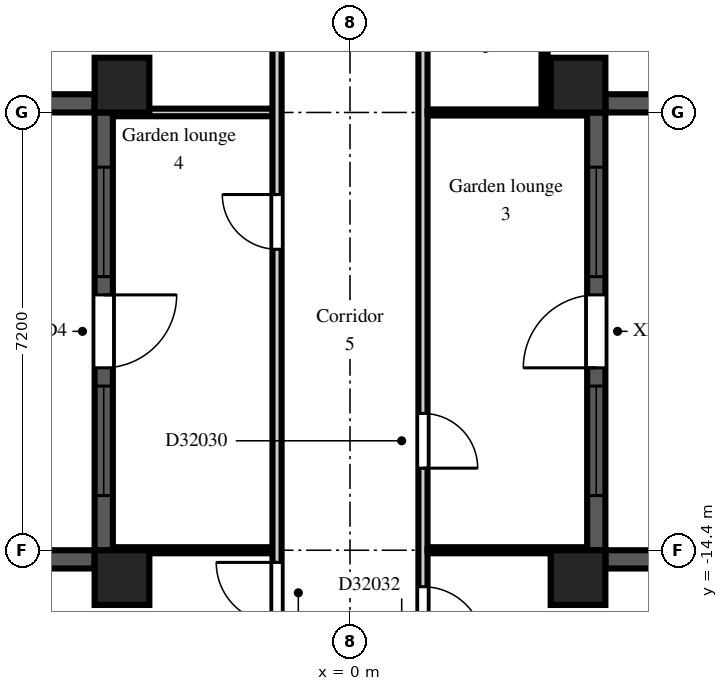
"""IFC4 building model, lengths in metres.
Left out: names, types, materials, properties, quantities, classifications, styles, units other than length and angle.
Written with IfcOpenShell. Run it as: python <this file> out.ifc"""

import sys

from ifc_helpers import new_model, si_unit, direction, frame, frame_2d, origin, origin_2d, place, context, subcontext, project, spatial, rectangle, extrude, element, fill, save


model = new_model("IFC4")
c1 = context("Model", 3, precision=1e-05, world=origin(), true_north=direction((0.0, 1.0)))
c2 = subcontext(c1, "Body", "Model", "MODEL_VIEW")
j1 = project(units=[si_unit("LENGTHUNIT", "METRE"), si_unit("PLANEANGLEUNIT", "RADIAN")], contexts=[c1])
p1 = place(None, origin())
s1 = spatial("IfcSite", under=j1, at=p1, CompositionType="ELEMENT")
p2 = place(p1, origin())
s2 = spatial("IfcBuilding", under=s1, at=p2, CompositionType="ELEMENT")
p3 = place(p2, frame((0.0, 0.0, 225.9)))
s3 = spatial("IfcBuildingStorey", under=s2, at=p3, CompositionType="ELEMENT", Elevation=225.9)
for number, where, z_axis, x_axis in (
    (1, (-3.75, -14.85, 0.0), (0.0, 0.0, 1.0), (1.0, 0.0, 0.0)),
    (2, (-3.75, -6.75, 0.0), (0.0, 0.0, 1.0), (1.0, 0.0, 0.0)),
    (3, (3.75, -14.85, 0.0), (0.0, 0.0, 1.0), (1.0, 0.0, 0.0)),
    (4, (3.75, -6.75, 0.0), (0.0, 0.0, 1.0), (1.0, 0.0, 0.0)),
):
    element("IfcColumn", number, at=place(p3, frame(where, z_axis=z_axis, x_axis=x_axis)), inside=s3, PredefinedType="COLUMN", context=c2, shape_type="SweptSolid", body=[
        extrude(rectangle(XDim=0.9, YDim=0.9, at=origin_2d()), origin(), (0.0, 0.0, 1.0), 3.0),
    ])
p4 = place(p3, frame((-7.2, -7.05, 0.0), z_axis=(0.0, 0.0, 1.0), x_axis=(1.0, 0.0, 0.0)))
e5 = element("IfcWall", 5, at=p4, inside=s3, PredefinedType="SOLIDWALL", context=c2, shape_type="SweptSolid", body=[
    extrude(rectangle(XDim=3.0, YDim=0.3, at=frame_2d((1.5, 0.0))), origin(), (0.0, 0.0, 1.0), 2.3),
])
p5 = place(p3, frame((-4.05, -7.2, 0.0), z_axis=(0.0, 0.0, 1.0), x_axis=(0.0, -1.0, 0.0)))
e6 = element("IfcWall", 6, at=p5, inside=s3, PredefinedType="SOLIDWALL", context=c2, shape_type="SweptSolid", body=[
    extrude(rectangle(XDim=7.2, YDim=0.3, at=frame_2d((3.6, 0.0))), origin(), (0.0, 0.0, 1.0), 2.3),
])
p6 = place(p5, frame((3.0, 0.0, 0.0)))
e7 = element("IfcOpeningElement", 7, at=p6, cuts=e6, PredefinedType="OPENING", context=c2, shape_type="SweptSolid", body=[
    extrude(rectangle(XDim=1.2, YDim=2.05, at=frame_2d((0.6, 1.025))), frame((0.0, 0.16, 0.0), z_axis=(0.0, -1.0, 0.0), x_axis=(1.0, 0.0, 0.0)), (0.0, 0.0, 1.0), 0.32),
])
p7 = place(p5, frame((0.9, 0.0, 0.2)))
e8 = element("IfcOpeningElement", 8, at=p7, cuts=e6, PredefinedType="OPENING", context=c2, shape_type="SweptSolid", body=[
    extrude(rectangle(XDim=1.8, YDim=1.85, at=frame_2d((0.9, 0.925))), frame((0.0, 0.16, 0.0), z_axis=(0.0, -1.0, 0.0), x_axis=(1.0, 0.0, 0.0)), (0.0, 0.0, 1.0), 0.32),
])
p8 = place(p5, frame((4.5, 0.0, 0.2)))
e9 = element("IfcOpeningElement", 9, at=p8, cuts=e6, PredefinedType="OPENING", context=c2, shape_type="SweptSolid", body=[
    extrude(rectangle(XDim=1.8, YDim=1.85, at=frame_2d((0.9, 0.925))), frame((0.0, 0.16, 0.0), z_axis=(0.0, -1.0, 0.0), x_axis=(1.0, 0.0, 0.0)), (0.0, 0.0, 1.0), 0.32),
])
for number, where, z_axis, x_axis in (
    (10, (-4.2, -14.55, 0.0), (0.0, 0.0, 1.0), (-1.0, 0.0, 0.0)),
    (11, (6.3, -14.55, 0.0), (0.0, 0.0, 1.0), (-1.0, 0.0, 0.0)),
):
    element("IfcWall", number, at=place(p3, frame(where, z_axis=z_axis, x_axis=x_axis)), inside=s3, PredefinedType="SOLIDWALL", context=c2, shape_type="SweptSolid", body=[
        extrude(rectangle(XDim=2.1, YDim=0.3, at=frame_2d((1.05, 0.0))), origin(), (0.0, 0.0, 1.0), 2.3),
    ])
p9 = place(p3, frame((4.05, -14.4, 0.0), z_axis=(0.0, 0.0, 1.0), x_axis=(0.0, 1.0, 0.0)))
e12 = element("IfcWall", 12, at=p9, inside=s3, PredefinedType="SOLIDWALL", context=c2, shape_type="SweptSolid", body=[
    extrude(rectangle(XDim=7.2, YDim=0.3, at=frame_2d((3.6, 0.0))), origin(), (0.0, 0.0, 1.0), 2.3),
])
p10 = place(p9, frame((3.0, 0.0, 0.0)))
e13 = element("IfcOpeningElement", 13, at=p10, cuts=e12, PredefinedType="OPENING", context=c2, shape_type="SweptSolid", body=[
    extrude(rectangle(XDim=1.2, YDim=2.05, at=frame_2d((0.6, 1.025))), frame((0.0, 0.16, 0.0), z_axis=(0.0, -1.0, 0.0), x_axis=(1.0, 0.0, 0.0)), (0.0, 0.0, 1.0), 0.32),
])
p11 = place(p9, frame((0.9, 0.0, 0.2)))
e14 = element("IfcOpeningElement", 14, at=p11, cuts=e12, PredefinedType="OPENING", context=c2, shape_type="SweptSolid", body=[
    extrude(rectangle(XDim=1.8, YDim=1.85, at=frame_2d((0.9, 0.925))), frame((0.0, 0.16, 0.0), z_axis=(0.0, -1.0, 0.0), x_axis=(1.0, 0.0, 0.0)), (0.0, 0.0, 1.0), 0.32),
])
p12 = place(p9, frame((4.5, 0.0, 0.2)))
e15 = element("IfcOpeningElement", 15, at=p12, cuts=e12, PredefinedType="OPENING", context=c2, shape_type="SweptSolid", body=[
    extrude(rectangle(XDim=1.8, YDim=1.85, at=frame_2d((0.9, 0.925))), frame((0.0, 0.16, 0.0), z_axis=(0.0, -1.0, 0.0), x_axis=(1.0, 0.0, 0.0)), (0.0, 0.0, 1.0), 0.32),
])
p13 = place(p3, frame((4.2, -7.05, 0.0), z_axis=(0.0, 0.0, 1.0), x_axis=(1.0, 0.0, 0.0)))
e16 = element("IfcWall", 16, at=p13, inside=s3, PredefinedType="SOLIDWALL", context=c2, shape_type="SweptSolid", body=[
    extrude(rectangle(XDim=3.0, YDim=0.3, at=frame_2d((1.5, 0.0))), origin(), (0.0, 0.0, 1.0), 2.3),
])
p14 = place(p3, frame((-3.9, -14.4, 0.0), z_axis=(0.0, 0.0, 1.0), x_axis=(1.0, 0.0, 0.0)))
e17 = element("IfcWall", 17, at=p14, inside=s3, PredefinedType="PARTITIONING", context=c2, shape_type="SweptSolid", body=[
    extrude(rectangle(XDim=2.625, YDim=0.1, at=frame_2d((1.312, 0.0))), origin(), (0.0, 0.0, 1.0), 2.6),
])
p15 = place(p3, frame((-3.9, -7.2, 0.0), z_axis=(0.0, 0.0, 1.0), x_axis=(1.0, 0.0, 0.0)))
e18 = element("IfcWall", 18, at=p15, inside=s3, PredefinedType="PARTITIONING", context=c2, shape_type="SweptSolid", body=[
    extrude(rectangle(XDim=2.625, YDim=0.125, at=frame_2d((1.312, 0.0))), origin(), (0.0, 0.0, 1.0), 2.6),
])
p16 = place(p3, frame((-1.2, -19.525, 0.0), z_axis=(0.0, 0.0, 1.0), x_axis=(0.0, 1.0, 0.0)))
e19 = element("IfcWall", 19, at=p16, inside=s3, PredefinedType="PARTITIONING", context=c2, shape_type="SweptSolid", body=[
    extrude(rectangle(XDim=18.25, YDim=0.15, at=frame_2d((9.125, 0.0))), origin(), (0.0, 0.0, 1.0), 2.6),
])
p17 = place(p16, frame((14.875, 0.0, 0.0)))
e20 = element("IfcOpeningElement", 20, at=p17, cuts=e19, PredefinedType="OPENING", context=c2, shape_type="SweptSolid", body=[
    extrude(rectangle(XDim=0.9, YDim=2.1, at=frame_2d((0.45, 1.05))), frame((0.0, 0.085, 0.0), z_axis=(0.0, -1.0, 0.0), x_axis=(1.0, 0.0, 0.0)), (0.0, 0.0, 1.0), 0.17),
])
p18 = place(p16, frame((10.075, 0.0, 0.0)))
e21 = element("IfcOpeningElement", 21, at=p18, cuts=e19, PredefinedType="OPENING", context=c2, shape_type="SweptSolid", body=[
    extrude(rectangle(XDim=0.9, YDim=2.1, at=frame_2d((0.45, 1.05))), frame((0.0, 0.085, 0.0), z_axis=(0.0, -1.0, 0.0), x_axis=(1.0, 0.0, 0.0)), (0.0, 0.0, 1.0), 0.17),
])
p19 = place(p16, frame((3.925, 0.0, 0.0)))
e22 = element("IfcOpeningElement", 22, at=p19, cuts=e19, PredefinedType="OPENING", context=c2, shape_type="SweptSolid", body=[
    extrude(rectangle(XDim=1.0, YDim=2.1, at=frame_2d((0.5, 1.05))), frame((0.0, 0.085, 0.0), z_axis=(0.0, -1.0, 0.0), x_axis=(1.0, 0.0, 0.0)), (0.0, 0.0, 1.0), 0.17),
])
p20 = place(p16, frame((0.275, 0.0, 0.0)))
e23 = element("IfcOpeningElement", 23, at=p20, cuts=e19, PredefinedType="OPENING", context=c2, shape_type="SweptSolid", body=[
    extrude(rectangle(XDim=0.9, YDim=2.1, at=frame_2d((0.45, 1.05))), frame((0.0, 0.085, 0.0), z_axis=(0.0, -1.0, 0.0), x_axis=(1.0, 0.0, 0.0)), (0.0, 0.0, 1.0), 0.17),
])
p21 = place(p3, frame((1.2, -19.525, 0.0), z_axis=(0.0, 0.0, 1.0), x_axis=(0.0, 1.0, 0.0)))
e24 = element("IfcWall", 24, at=p21, inside=s3, PredefinedType="PARTITIONING", context=c2, shape_type="SweptSolid", body=[
    extrude(rectangle(XDim=18.4, YDim=0.15, at=frame_2d((9.2, 0.0))), origin(), (0.0, 0.0, 1.0), 2.6),
])
p22 = place(p21, frame((14.875, 0.0, 0.0)))
e25 = element("IfcOpeningElement", 25, at=p22, cuts=e24, PredefinedType="OPENING", context=c2, shape_type="SweptSolid", body=[
    extrude(rectangle(XDim=0.9, YDim=2.1, at=frame_2d((0.45, 1.05))), frame((0.0, 0.085, 0.0), z_axis=(0.0, -1.0, 0.0), x_axis=(1.0, 0.0, 0.0)), (0.0, 0.0, 1.0), 0.17),
])
p23 = place(p21, frame((6.475, 0.0, 0.0)))
e26 = element("IfcOpeningElement", 26, at=p23, cuts=e24, PredefinedType="OPENING", context=c2, shape_type="SweptSolid", body=[
    extrude(rectangle(XDim=0.9, YDim=2.1, at=frame_2d((0.45, 1.05))), frame((0.0, 0.085, 0.0), z_axis=(0.0, -1.0, 0.0), x_axis=(1.0, 0.0, 0.0)), (0.0, 0.0, 1.0), 0.17),
])
p24 = place(p21, frame((3.525, 0.0, 0.0)))
e27 = element("IfcOpeningElement", 27, at=p24, cuts=e24, PredefinedType="OPENING", context=c2, shape_type="SweptSolid", body=[
    extrude(rectangle(XDim=1.0, YDim=2.1, at=frame_2d((0.5, 1.05))), frame((0.0, 0.085, 0.0), z_axis=(0.0, -1.0, 0.0), x_axis=(1.0, 0.0, 0.0)), (0.0, 0.0, 1.0), 0.17),
])
p25 = place(p21, frame((0.275, 0.0, 0.0)))
e28 = element("IfcOpeningElement", 28, at=p25, cuts=e24, PredefinedType="OPENING", context=c2, shape_type="SweptSolid", body=[
    extrude(rectangle(XDim=0.9, YDim=2.1, at=frame_2d((0.45, 1.05))), frame((0.0, 0.085, 0.0), z_axis=(0.0, -1.0, 0.0), x_axis=(1.0, 0.0, 0.0)), (0.0, 0.0, 1.0), 0.17),
])
for number, where, z_axis, x_axis in (
    (29, (1.275, -14.4, 0.0), (0.0, 0.0, 1.0), (1.0, 0.0, 0.0)),
    (30, (1.275, -7.2, 0.0), (0.0, 0.0, 1.0), (1.0, 0.0, 0.0)),
):
    element("IfcWall", number, at=place(p3, frame(where, z_axis=z_axis, x_axis=x_axis)), inside=s3, PredefinedType="PARTITIONING", context=c2, shape_type="SweptSolid", body=[
        extrude(rectangle(XDim=2.625, YDim=0.1, at=frame_2d((1.312, 0.0))), origin(), (0.0, 0.0, 1.0), 2.6),
    ])
p26 = place(p3, frame((3.2, -7.15, 0.0), z_axis=(0.0, 0.0, 1.0), x_axis=(0.0, 1.0, 0.0)))
e31 = element("IfcWall", 31, at=p26, inside=s3, PredefinedType="PARTITIONING", context=c2, shape_type="SweptSolid", body=[
    extrude(rectangle(XDim=5.875, YDim=0.1, at=frame_2d((2.938, 0.0))), origin(), (0.0, 0.0, 1.0), 2.6),
])
p27 = place(p6, origin())
e32 = element("IfcDoor", 32, at=p27, inside=s3, OperationType="SINGLE_SWING_LEFT", PredefinedType="DOOR", context=c2, shape_type="SweptSolid", body=[
    extrude(rectangle(XDim=1.2, YDim=2.05, at=frame_2d((0.6, 1.025))), frame((0.0, 0.025, 0.0), z_axis=(0.0, -1.0, 0.0), x_axis=(1.0, 0.0, 0.0)), (0.0, 0.0, 1.0), 0.05),
])
fill(e7, e32)
p28 = place(p7, origin())
e33 = element("IfcWindow", 33, at=p28, inside=s3, PartitioningType="SINGLE_PANEL", PredefinedType="WINDOW", context=c2, shape_type="SweptSolid", body=[
    extrude(rectangle(XDim=1.8, YDim=1.85, at=frame_2d((0.9, 0.925))), frame((0.0, 0.03, 0.0), z_axis=(0.0, -1.0, 0.0), x_axis=(1.0, 0.0, 0.0)), (0.0, 0.0, 1.0), 0.06),
])
fill(e8, e33)
p29 = place(p8, origin())
e34 = element("IfcWindow", 34, at=p29, inside=s3, PartitioningType="SINGLE_PANEL", PredefinedType="WINDOW", context=c2, shape_type="SweptSolid", body=[
    extrude(rectangle(XDim=1.8, YDim=1.85, at=frame_2d((0.9, 0.925))), frame((0.0, 0.03, 0.0), z_axis=(0.0, -1.0, 0.0), x_axis=(1.0, 0.0, 0.0)), (0.0, 0.0, 1.0), 0.06),
])
fill(e9, e34)
p30 = place(p10, origin())
e35 = element("IfcDoor", 35, at=p30, inside=s3, OperationType="SINGLE_SWING_LEFT", PredefinedType="DOOR", context=c2, shape_type="SweptSolid", body=[
    extrude(rectangle(XDim=1.2, YDim=2.05, at=frame_2d((0.6, 1.025))), frame((0.0, 0.025, 0.0), z_axis=(0.0, -1.0, 0.0), x_axis=(1.0, 0.0, 0.0)), (0.0, 0.0, 1.0), 0.05),
])
fill(e13, e35)
p31 = place(p11, origin())
e36 = element("IfcWindow", 36, at=p31, inside=s3, PartitioningType="SINGLE_PANEL", PredefinedType="WINDOW", context=c2, shape_type="SweptSolid", body=[
    extrude(rectangle(XDim=1.8, YDim=1.85, at=frame_2d((0.9, 0.925))), frame((0.0, 0.03, 0.0), z_axis=(0.0, -1.0, 0.0), x_axis=(1.0, 0.0, 0.0)), (0.0, 0.0, 1.0), 0.06),
])
fill(e14, e36)
p32 = place(p12, origin())
e37 = element("IfcWindow", 37, at=p32, inside=s3, PartitioningType="SINGLE_PANEL", PredefinedType="WINDOW", context=c2, shape_type="SweptSolid", body=[
    extrude(rectangle(XDim=1.8, YDim=1.85, at=frame_2d((0.9, 0.925))), frame((0.0, 0.03, 0.0), z_axis=(0.0, -1.0, 0.0), x_axis=(1.0, 0.0, 0.0)), (0.0, 0.0, 1.0), 0.06),
])
fill(e15, e37)
p33 = place(p23, frame((0.9, 0.0, 0.0), z_axis=(0.0, 0.0, 1.0), x_axis=(-1.0, 0.0, 0.0)))
e38 = element("IfcDoor", 38, at=p33, inside=s3, OperationType="SINGLE_SWING_RIGHT", PredefinedType="DOOR", context=c2, shape_type="SweptSolid", body=[
    extrude(rectangle(XDim=0.9, YDim=2.1, at=frame_2d((0.45, 1.05))), frame((0.0, 0.025, 0.0), z_axis=(0.0, -1.0, 0.0), x_axis=(1.0, 0.0, 0.0)), (0.0, 0.0, 1.0), 0.05),
])
fill(e26, e38)
p34 = place(p24, frame((1.0, 0.0, 0.0), z_axis=(0.0, 0.0, 1.0), x_axis=(-1.0, 0.0, 0.0)))
e39 = element("IfcDoor", 39, at=p34, inside=s3, OperationType="SINGLE_SWING_RIGHT", PredefinedType="DOOR", context=c2, shape_type="SweptSolid", body=[
    extrude(rectangle(XDim=1.0, YDim=2.1, at=frame_2d((0.5, 1.05))), frame((0.0, 0.025, 0.0), z_axis=(0.0, -1.0, 0.0), x_axis=(1.0, 0.0, 0.0)), (0.0, 0.0, 1.0), 0.05),
])
fill(e27, e39)
p35 = place(p18, origin())
e40 = element("IfcDoor", 40, at=p35, inside=s3, OperationType="SINGLE_SWING_RIGHT", PredefinedType="DOOR", context=c2, shape_type="SweptSolid", body=[
    extrude(rectangle(XDim=0.9, YDim=2.1, at=frame_2d((0.45, 1.05))), frame((0.0, 0.025, 0.0), z_axis=(0.0, -1.0, 0.0), x_axis=(1.0, 0.0, 0.0)), (0.0, 0.0, 1.0), 0.05),
])
fill(e21, e40)
p36 = place(p19, origin())
e41 = element("IfcDoor", 41, at=p36, inside=s3, OperationType="SINGLE_SWING_RIGHT", PredefinedType="DOOR", context=c2, shape_type="SweptSolid", body=[
    extrude(rectangle(XDim=1.0, YDim=2.1, at=frame_2d((0.5, 1.05))), frame((0.0, 0.025, 0.0), z_axis=(0.0, -1.0, 0.0), x_axis=(1.0, 0.0, 0.0)), (0.0, 0.0, 1.0), 0.05),
])
fill(e22, e41)
save(model, sys.argv[1])
